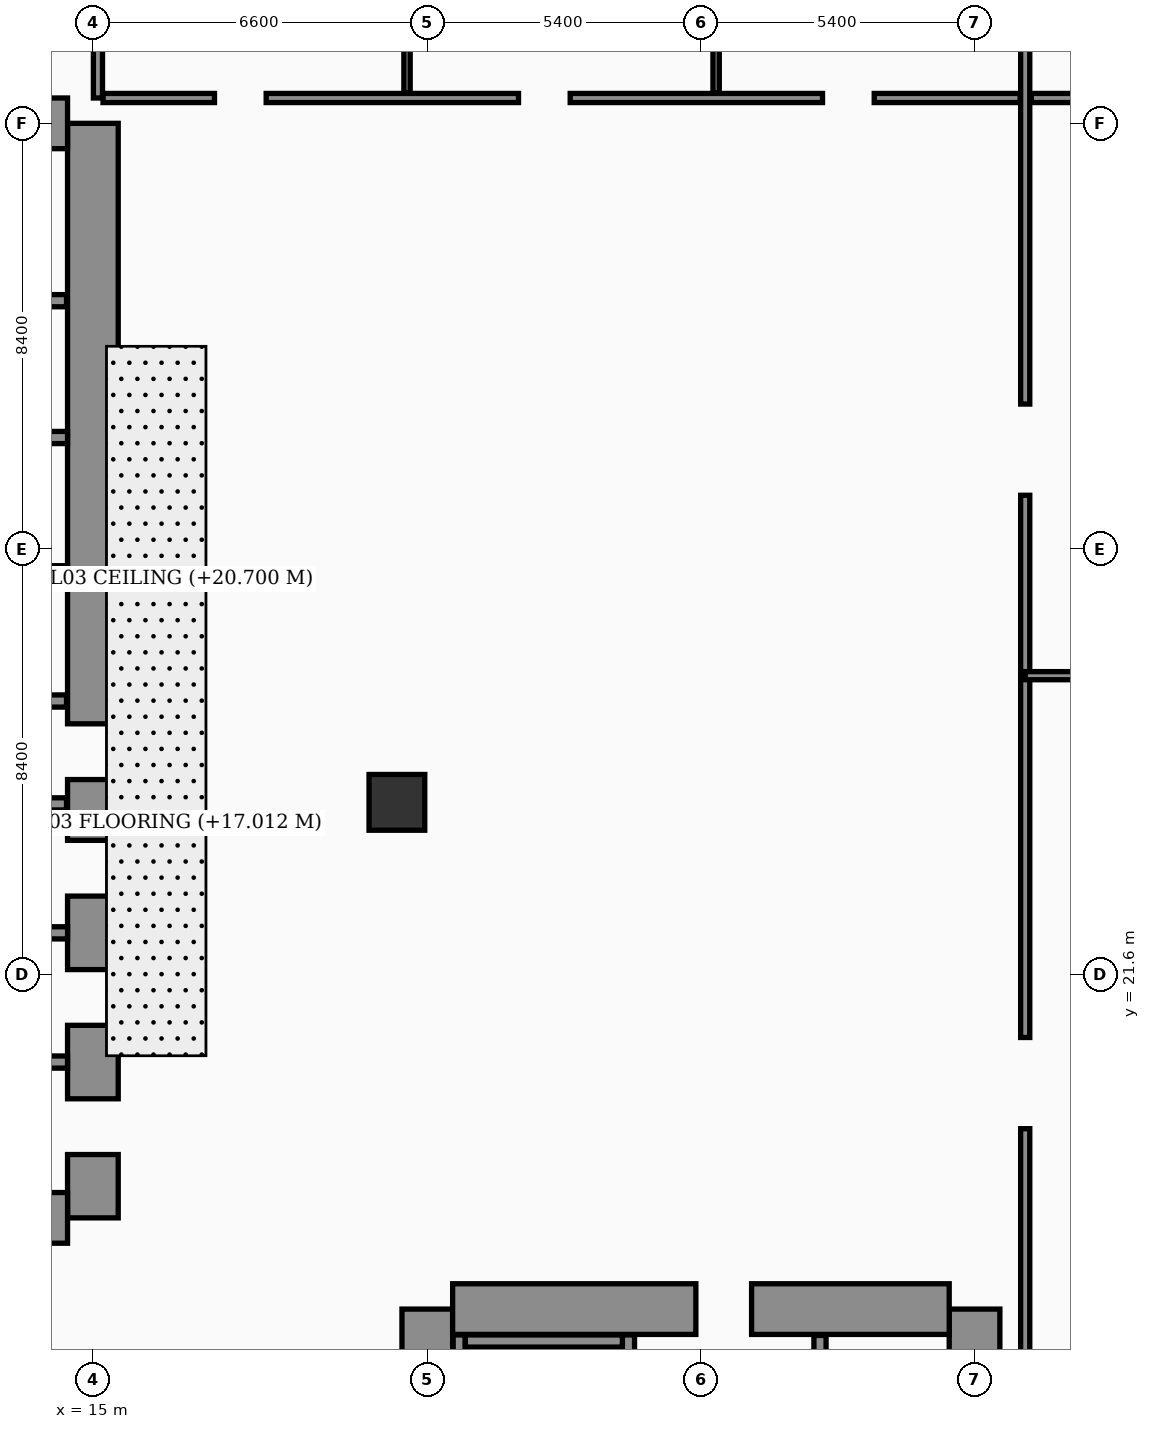
"""IFC4 building model, lengths in metres.
Left out: names, types, materials, properties, quantities, classifications, styles, units other than length and angle.
Written with IfcOpenShell. Run it as: python <this file> out.ifc"""

import sys

from ifc_helpers import new_model, si_unit, direction, frame, frame_2d, origin, origin_2d, place, context, subcontext, project, spatial, rectangle, hollow_rectangle, extrude, element, fill, save


model = new_model("IFC4")
c1 = context("Model", 3, precision=1e-05, world=origin(), true_north=direction((0.0, 1.0)))
c2 = subcontext(c1, "Body", "Model", "MODEL_VIEW")
j1 = project(units=[si_unit("LENGTHUNIT", "METRE"), si_unit("PLANEANGLEUNIT", "RADIAN")], contexts=[c1])
p1 = place(None, origin())
s1 = spatial("IfcSite", under=j1, at=p1, CompositionType="ELEMENT")
p2 = place(p1, origin())
s2 = spatial("IfcBuilding", under=s1, at=p2, CompositionType="ELEMENT")
p3 = place(p2, frame((0.0, 0.0, 17.0)))
s3 = spatial("IfcBuildingStorey", under=s2, at=p3, CompositionType="ELEMENT", Elevation=17.0)
p4 = place(p3, frame((15.0, 16.8, 0.0), z_axis=(0.0, 0.0, 1.0), x_axis=(0.0, 1.0, 0.0)))
e1 = element("IfcWall", 1, at=p4, inside=s3, PredefinedType="SHEAR", context=c2, shape_type="SweptSolid", body=[
    extrude(rectangle(XDim=21.6, YDim=1.0, at=frame_2d((10.8, 0.0))), origin(), (0.0, 0.0, 1.0), 4.55),
])
p5 = place(p4, frame((8.65, 0.0, 0.0)))
e2 = element("IfcOpeningElement", 2, at=p5, cuts=e1, PredefinedType="OPENING", context=c2, shape_type="SweptSolid", body=[
    extrude(rectangle(XDim=1.1, YDim=2.2, at=frame_2d((0.55, 1.1))), frame((0.0, 0.51, 0.0), z_axis=(0.0, -1.0, 0.0), x_axis=(1.0, 0.0, 0.0)), (0.0, 0.0, 1.0), 1.02),
])
p6 = place(p4, frame((1.25, 0.0, 0.0)))
e3 = element("IfcOpeningElement", 3, at=p6, cuts=e1, PredefinedType="OPENING", context=c2, shape_type="SweptSolid", body=[
    extrude(rectangle(XDim=1.1, YDim=2.2, at=frame_2d((0.55, 1.1))), frame((0.0, 0.51, 0.0), z_axis=(0.0, -1.0, 0.0), x_axis=(1.0, 0.0, 0.0)), (0.0, 0.0, 1.0), 1.02),
])
p7 = place(p4, frame((3.8, 0.0, 0.0)))
e4 = element("IfcOpeningElement", 4, at=p7, cuts=e1, PredefinedType="OPENING", context=c2, shape_type="SweptSolid", body=[
    extrude(rectangle(XDim=1.1, YDim=2.2, at=frame_2d((0.55, 1.1))), frame((0.0, 0.51, 0.0), z_axis=(0.0, -1.0, 0.0), x_axis=(1.0, 0.0, 0.0)), (0.0, 0.0, 1.0), 1.02),
])
p8 = place(p4, frame((6.35, 0.0, 0.0)))
e5 = element("IfcOpeningElement", 5, at=p8, cuts=e1, PredefinedType="OPENING", context=c2, shape_type="SweptSolid", body=[
    extrude(rectangle(XDim=1.1, YDim=2.2, at=frame_2d((0.55, 1.1))), frame((0.0, 0.51, 0.0), z_axis=(0.0, -1.0, 0.0), x_axis=(1.0, 0.0, 0.0)), (0.0, 0.0, 1.0), 1.02),
])
for number, where, z_axis, x_axis in (
    (6, (4.7, 38.4, 0.0), (0.0, 0.0, 1.0), (1.0, 0.0, 0.0)),
    (7, (4.7, 16.8, 0.0), (0.0, 0.0, 1.0), (1.0, 0.0, 0.0)),
):
    element("IfcWall", number, at=place(p3, frame(where, z_axis=z_axis, x_axis=x_axis)), inside=s3, PredefinedType="SHEAR", context=c2, shape_type="SweptSolid", body=[
        extrude(rectangle(XDim=9.8, YDim=1.0, at=frame_2d((4.9, 0.0))), origin(), (0.0, 0.0, 1.0), 4.55),
    ])
for number, where, z_axis, x_axis in (
    (8, (21.6, 4.6, 0.0), (0.0, 0.0, 1.0), (0.0, 1.0, 0.0)),
    (9, (32.4, 4.6, 0.0), (0.0, 0.0, 1.0), (0.0, 1.0, 0.0)),
):
    element("IfcWall", number, at=place(p3, frame(where, z_axis=z_axis, x_axis=x_axis)), inside=s3, PredefinedType="SHEAR", context=c2, shape_type="SweptSolid", body=[
        extrude(rectangle(XDim=10.4, YDim=1.0, at=frame_2d((5.2, 0.0))), origin(), (0.0, 0.0, 1.0), 4.55),
    ])
p9 = place(p3, frame((22.1, 15.0, 0.0), z_axis=(0.0, 0.0, 1.0), x_axis=(1.0, 0.0, 0.0)))
e10 = element("IfcWall", 10, at=p9, inside=s3, PredefinedType="SHEAR", context=c2, shape_type="SweptSolid", body=[
    extrude(rectangle(XDim=9.8, YDim=1.0, at=frame_2d((4.9, 0.0))), origin(), (0.0, 0.0, 1.0), 4.55),
])
p10 = place(p9, frame((4.8, 0.0, 0.0)))
e11 = element("IfcOpeningElement", 11, at=p10, cuts=e10, PredefinedType="OPENING", context=c2, shape_type="SweptSolid", body=[
    extrude(rectangle(XDim=1.1, YDim=2.2, at=frame_2d((0.55, 1.1))), frame((0.0, 0.51, 0.0), z_axis=(0.0, -1.0, 0.0), x_axis=(1.0, 0.0, 0.0)), (0.0, 0.0, 1.0), 1.02),
])
p11 = place(p3, frame((22.23, 5.1, 0.0), z_axis=(0.0, 0.0, 1.0), x_axis=(0.0, 1.0, 0.0)))
e12 = element("IfcWall", 12, at=p11, inside=s3, PredefinedType="SOLIDWALL", context=c2, shape_type="SweptSolid", body=[
    extrude(rectangle(XDim=9.39, YDim=0.24, at=frame_2d((4.695, 0.0))), origin(), (0.0, 0.0, 1.0), 4.55),
])
p12 = place(p3, frame((25.57, 5.1, 0.0), z_axis=(0.0, 0.0, 1.0), x_axis=(0.0, 1.0, 0.0)))
e13 = element("IfcWall", 13, at=p12, inside=s3, PredefinedType="SOLIDWALL", context=c2, shape_type="SweptSolid", body=[
    extrude(rectangle(XDim=9.39, YDim=0.24, at=frame_2d((4.695, 0.0))), origin(), (0.0, 0.0, 1.0), 4.55),
])
p13 = place(p12, frame((0.35, 0.0, 0.0)))
e14 = element("IfcOpeningElement", 14, at=p13, cuts=e13, PredefinedType="OPENING", context=c2, shape_type="SweptSolid", body=[
    extrude(rectangle(XDim=1.15, YDim=2.2, at=frame_2d((0.575, 1.1))), frame((0.0, 0.13, 0.0), z_axis=(0.0, -1.0, 0.0), x_axis=(1.0, 0.0, 0.0)), (0.0, 0.0, 1.0), 0.26),
])
p14 = place(p3, frame((22.35, 14.37, 0.0), z_axis=(0.0, 0.0, 1.0), x_axis=(1.0, 0.0, 0.0)))
e15 = element("IfcWall", 15, at=p14, inside=s3, PredefinedType="SOLIDWALL", context=c2, shape_type="SweptSolid", body=[
    extrude(rectangle(XDim=3.1, YDim=0.24, at=frame_2d((1.55, 0.0))), origin(), (0.0, 0.0, 1.0), 4.55),
])
for number, where, z_axis, x_axis in (
    (16, (12.18, 19.875, 0.0), (0.0, 0.0, 1.0), (1.0, 0.0, 0.0)),
    (17, (12.18, 22.425, 0.0), (0.0, 0.0, 1.0), (1.0, 0.0, 0.0)),
    (18, (12.18, 29.55, 0.0), (0.0, 0.0, 1.0), (1.0, 0.0, 0.0)),
    (19, (12.18, 32.2, 0.0), (0.0, 0.0, 1.0), (1.0, 0.0, 0.0)),
):
    element("IfcWall", number, at=place(p3, frame(where, z_axis=z_axis, x_axis=x_axis)), inside=s3, PredefinedType="SOLIDWALL", context=c2, shape_type="SweptSolid", body=[
        extrude(rectangle(XDim=2.32, YDim=0.24, at=frame_2d((1.16, 0.0))), origin(), (0.0, 0.0, 1.0), 4.55),
    ])
p15 = place(p3, frame((21.0, 25.0, 0.0), z_axis=(0.0, 0.0, 1.0), x_axis=(1.0, 0.0, 0.0)))
e20 = element("IfcColumn", 20, at=p15, inside=s3, PredefinedType="COLUMN", context=c2, shape_type="SweptSolid", body=[
    extrude(hollow_rectangle(XDim=1.1, YDim=1.1, WallThickness=0.045, at=origin_2d()), origin(), (0.0, 0.0, 1.0), 4.55),
])
p16 = place(p3, frame((12.15, 24.97, 0.0), z_axis=(0.0, 0.0, 1.0), x_axis=(1.0, 0.0, 0.0)))
e21 = element("IfcWall", 21, at=p16, inside=s3, PredefinedType="SOLIDWALL", context=c2, shape_type="SweptSolid", body=[
    extrude(rectangle(XDim=2.33, YDim=0.24, at=frame_2d((1.165, 0.0))), origin(), (0.0, 0.0, 1.0), 3.75),
])
p17 = place(p3, frame((12.25, 27.0, 0.0), z_axis=(0.0, 0.0, 1.0), x_axis=(1.0, 0.0, 0.0)))
e22 = element("IfcWall", 22, at=p17, inside=s3, PredefinedType="SOLIDWALL", context=c2, shape_type="SweptSolid", body=[
    extrude(rectangle(XDim=2.23, YDim=0.24, at=frame_2d((1.115, 0.0))), origin(), (0.0, 0.0, 1.0), 4.55),
])
p18 = place(p3, frame((9.66, 34.9, 0.0), z_axis=(0.0, 0.0, 1.0), x_axis=(1.0, 0.0, 0.0)))
e23 = element("IfcWall", 23, at=p18, inside=s3, PredefinedType="SOLIDWALL", context=c2, shape_type="SweptSolid", body=[
    extrude(rectangle(XDim=4.82, YDim=0.24, at=frame_2d((2.41, 0.0))), origin(), (0.0, 0.0, 1.0), 4.55),
])
p19 = place(p3, frame((29.35, 5.12, 0.0), z_axis=(0.0, 0.0, 1.0), x_axis=(0.0, 1.0, 0.0)))
e24 = element("IfcWall", 24, at=p19, inside=s3, PredefinedType="SOLIDWALL", context=c2, shape_type="SweptSolid", body=[
    extrude(rectangle(XDim=9.36, YDim=0.24, at=frame_2d((4.68, 0.0))), origin(), (0.0, 0.0, 1.0), 4.55),
])
p20 = place(p19, frame((0.55, 0.0, 0.0)))
e25 = element("IfcOpeningElement", 25, at=p20, cuts=e24, PredefinedType="OPENING", context=c2, shape_type="SweptSolid", body=[
    extrude(rectangle(XDim=1.3, YDim=2.35, at=frame_2d((0.65, 1.175))), frame((0.0, 0.13, 0.0), z_axis=(0.0, -1.0, 0.0), x_axis=(1.0, 0.0, 0.0)), (0.0, 0.0, 1.0), 0.26),
])
p21 = place(p3, frame((15.2, 38.9, 0.0), z_axis=(0.0, 0.0, 1.0), x_axis=(1.0, 0.0, 0.0)))
e26 = element("IfcWall", 26, at=p21, inside=s3, PredefinedType="PARTITIONING", context=c2, shape_type="SweptSolid", body=[
    extrude(rectangle(XDim=18.1, YDim=0.18, at=frame_2d((9.05, 0.0))), origin(), (0.0, 0.0, 1.0), 3.75),
])
p22 = place(p21, frame((2.2, 0.0, 0.0)))
e27 = element("IfcOpeningElement", 27, at=p22, cuts=e26, PredefinedType="OPENING", context=c2, shape_type="SweptSolid", body=[
    extrude(rectangle(XDim=1.02, YDim=2.2, at=frame_2d((0.51, 1.1))), frame((0.0, 0.1, 0.0), z_axis=(0.0, -1.0, 0.0), x_axis=(1.0, 0.0, 0.0)), (0.0, 0.0, 1.0), 0.2),
])
p23 = place(p21, frame((8.2, 0.0, 0.0)))
e28 = element("IfcOpeningElement", 28, at=p23, cuts=e26, PredefinedType="OPENING", context=c2, shape_type="SweptSolid", body=[
    extrude(rectangle(XDim=1.02, YDim=2.2, at=frame_2d((0.51, 1.1))), frame((0.0, 0.1, 0.0), z_axis=(0.0, -1.0, 0.0), x_axis=(1.0, 0.0, 0.0)), (0.0, 0.0, 1.0), 0.2),
])
p24 = place(p21, frame((14.2, 0.0, 0.0)))
e29 = element("IfcOpeningElement", 29, at=p24, cuts=e26, PredefinedType="OPENING", context=c2, shape_type="SweptSolid", body=[
    extrude(rectangle(XDim=1.02, YDim=2.2, at=frame_2d((0.51, 1.1))), frame((0.0, 0.1, 0.0), z_axis=(0.0, -1.0, 0.0), x_axis=(1.0, 0.0, 0.0)), (0.0, 0.0, 1.0), 0.2),
])
p25 = place(p3, frame((15.1, 38.9, 0.0), z_axis=(0.0, 0.0, 1.0), x_axis=(0.0, 1.0, 0.0)))
e30 = element("IfcWall", 30, at=p25, inside=s3, PredefinedType="PARTITIONING", context=c2, shape_type="SweptSolid", body=[
    extrude(rectangle(XDim=6.4, YDim=0.18, at=frame_2d((3.2, 0.0))), origin(), (0.0, 0.0, 1.0), 3.75),
])
p26 = place(p3, frame((21.2, 39.0, 0.0), z_axis=(0.0, 0.0, 1.0), x_axis=(0.0, 1.0, 0.0)))
e31 = element("IfcWall", 31, at=p26, inside=s3, PredefinedType="PARTITIONING", context=c2, shape_type="SweptSolid", body=[
    extrude(rectangle(XDim=6.2, YDim=0.125, at=frame_2d((3.1, 0.0))), origin(), (0.0, 0.0, 1.0), 3.75),
])
p27 = place(p3, frame((27.3, 39.0, 0.0), z_axis=(0.0, 0.0, 1.0), x_axis=(0.0, 1.0, 0.0)))
e32 = element("IfcWall", 32, at=p27, inside=s3, PredefinedType="PARTITIONING", context=c2, shape_type="SweptSolid", body=[
    extrude(rectangle(XDim=6.2, YDim=0.125, at=frame_2d((3.1, 0.0))), origin(), (0.0, 0.0, 1.0), 4.55),
])
p28 = place(p3, frame((33.4, 0.06, 0.0), z_axis=(0.0, 0.0, 1.0), x_axis=(0.0, 1.0, 0.0)))
e33 = element("IfcWall", 33, at=p28, inside=s3, PredefinedType="PARTITIONING", context=c2, shape_type="SweptSolid", body=[
    extrude(rectangle(XDim=55.38, YDim=0.18, at=frame_2d((27.69, 0.0))), origin(), (0.0, 0.0, 1.0), 3.75),
])
p29 = place(p28, frame((18.5, 0.0, 0.0)))
e34 = element("IfcOpeningElement", 34, at=p29, cuts=e33, PredefinedType="OPENING", context=c2, shape_type="SweptSolid", body=[
    extrude(rectangle(XDim=1.8, YDim=2.4, at=frame_2d((0.9, 1.2))), frame((0.0, 0.1, 0.0), z_axis=(0.0, -1.0, 0.0), x_axis=(1.0, 0.0, 0.0)), (0.0, 0.0, 1.0), 0.2),
])
p30 = place(p28, frame((31.0, 0.0, 0.0)))
e35 = element("IfcOpeningElement", 35, at=p30, cuts=e33, PredefinedType="OPENING", context=c2, shape_type="SweptSolid", body=[
    extrude(rectangle(XDim=1.8, YDim=2.4, at=frame_2d((0.9, 1.2))), frame((0.0, 0.1, 0.0), z_axis=(0.0, -1.0, 0.0), x_axis=(1.0, 0.0, 0.0)), (0.0, 0.0, 1.0), 0.2),
])
p31 = place(p3, frame((33.4, 27.5, 0.0), z_axis=(0.0, 0.0, 1.0), x_axis=(1.0, 0.0, 0.0)))
e36 = element("IfcWall", 36, at=p31, inside=s3, PredefinedType="PARTITIONING", context=c2, shape_type="SweptSolid", body=[
    extrude(rectangle(XDim=42.54, YDim=0.16, at=frame_2d((21.27, 0.0))), origin(), (0.0, 0.0, 1.0), 3.05),
])
p32 = place(p3, frame((33.52, 38.9, 0.0), z_axis=(0.0, 0.0, 1.0), x_axis=(1.0, 0.0, 0.0)))
e37 = element("IfcWall", 37, at=p32, inside=s3, PredefinedType="PARTITIONING", context=c2, shape_type="SweptSolid", body=[
    extrude(rectangle(XDim=42.16, YDim=0.18, at=frame_2d((21.08, 0.0))), origin(), (0.0, 0.0, 1.0), 3.75),
])
p33 = place(p22, origin())
e38 = element("IfcDoor", 38, at=p33, inside=s3, OperationType="SINGLE_SWING_LEFT", PredefinedType="DOOR", context=c2, shape_type="SweptSolid", body=[
    extrude(rectangle(XDim=1.02, YDim=2.2, at=frame_2d((0.51, 1.1))), frame((0.0, 0.025, 0.0), z_axis=(0.0, -1.0, 0.0), x_axis=(1.0, 0.0, 0.0)), (0.0, 0.0, 1.0), 0.05),
])
fill(e27, e38)
p34 = place(p23, origin())
e39 = element("IfcDoor", 39, at=p34, inside=s3, OperationType="SINGLE_SWING_RIGHT", PredefinedType="DOOR", context=c2, shape_type="SweptSolid", body=[
    extrude(rectangle(XDim=1.02, YDim=2.2, at=frame_2d((0.51, 1.1))), frame((0.0, 0.025, 0.0), z_axis=(0.0, -1.0, 0.0), x_axis=(1.0, 0.0, 0.0)), (0.0, 0.0, 1.0), 0.05),
])
fill(e28, e39)
p35 = place(p24, origin())
e40 = element("IfcDoor", 40, at=p35, inside=s3, OperationType="SINGLE_SWING_LEFT", PredefinedType="DOOR", context=c2, shape_type="SweptSolid", body=[
    extrude(rectangle(XDim=1.02, YDim=2.2, at=frame_2d((0.51, 1.1))), frame((0.0, 0.025, 0.0), z_axis=(0.0, -1.0, 0.0), x_axis=(1.0, 0.0, 0.0)), (0.0, 0.0, 1.0), 0.05),
])
fill(e29, e40)
p36 = place(p29, origin())
e41 = element("IfcDoor", 41, at=p36, inside=s3, OperationType="SINGLE_SWING_LEFT", PredefinedType="DOOR", context=c2, shape_type="SweptSolid", body=[
    extrude(rectangle(XDim=1.8, YDim=2.4, at=frame_2d((0.9, 1.2))), frame((0.0, 0.025, 0.0), z_axis=(0.0, -1.0, 0.0), x_axis=(1.0, 0.0, 0.0)), (0.0, 0.0, 1.0), 0.05),
])
fill(e34, e41)
p37 = place(p30, origin())
e42 = element("IfcDoor", 42, at=p37, inside=s3, OperationType="SINGLE_SWING_RIGHT", PredefinedType="DOOR", context=c2, shape_type="SweptSolid", body=[
    extrude(rectangle(XDim=1.8, YDim=2.4, at=frame_2d((0.9, 1.2))), frame((0.0, 0.025, 0.0), z_axis=(0.0, -1.0, 0.0), x_axis=(1.0, 0.0, 0.0)), (0.0, 0.0, 1.0), 0.05),
])
fill(e35, e42)
p38 = place(p5, origin())
e43 = element("IfcDoor", 43, at=p38, inside=s3, OperationType="SINGLE_SWING_RIGHT", PredefinedType="DOOR", context=c2, shape_type="SweptSolid", body=[
    extrude(rectangle(XDim=1.1, YDim=2.2, at=frame_2d((0.55, 1.1))), frame((0.0, 0.025, 0.0), z_axis=(0.0, -1.0, 0.0), x_axis=(1.0, 0.0, 0.0)), (0.0, 0.0, 1.0), 0.05),
])
fill(e2, e43)
p39 = place(p6, origin())
e44 = element("IfcDoor", 44, at=p39, inside=s3, OperationType="DOUBLE_DOOR_SLIDING", PredefinedType="DOOR", context=c2, shape_type="SweptSolid", body=[
    extrude(rectangle(XDim=1.1, YDim=2.2, at=frame_2d((0.55, 1.1))), frame((0.0, 0.025, 0.0), z_axis=(0.0, -1.0, 0.0), x_axis=(1.0, 0.0, 0.0)), (0.0, 0.0, 1.0), 0.05),
])
fill(e3, e44)
p40 = place(p7, origin())
e45 = element("IfcDoor", 45, at=p40, inside=s3, OperationType="DOUBLE_DOOR_SLIDING", PredefinedType="DOOR", context=c2, shape_type="SweptSolid", body=[
    extrude(rectangle(XDim=1.1, YDim=2.2, at=frame_2d((0.55, 1.1))), frame((0.0, 0.025, 0.0), z_axis=(0.0, -1.0, 0.0), x_axis=(1.0, 0.0, 0.0)), (0.0, 0.0, 1.0), 0.05),
])
fill(e4, e45)
p41 = place(p8, origin())
e46 = element("IfcDoor", 46, at=p41, inside=s3, OperationType="DOUBLE_DOOR_SLIDING", PredefinedType="DOOR", context=c2, shape_type="SweptSolid", body=[
    extrude(rectangle(XDim=1.1, YDim=2.2, at=frame_2d((0.55, 1.1))), frame((0.0, 0.025, 0.0), z_axis=(0.0, -1.0, 0.0), x_axis=(1.0, 0.0, 0.0)), (0.0, 0.0, 1.0), 0.05),
])
fill(e5, e46)
p42 = place(p10, origin())
e47 = element("IfcDoor", 47, at=p42, inside=s3, OperationType="SINGLE_SWING_LEFT", PredefinedType="DOOR", context=c2, shape_type="SweptSolid", body=[
    extrude(rectangle(XDim=1.1, YDim=2.2, at=frame_2d((0.55, 1.1))), frame((0.0, 0.025, 0.0), z_axis=(0.0, -1.0, 0.0), x_axis=(1.0, 0.0, 0.0)), (0.0, 0.0, 1.0), 0.05),
])
fill(e11, e47)
save(model, sys.argv[1])
